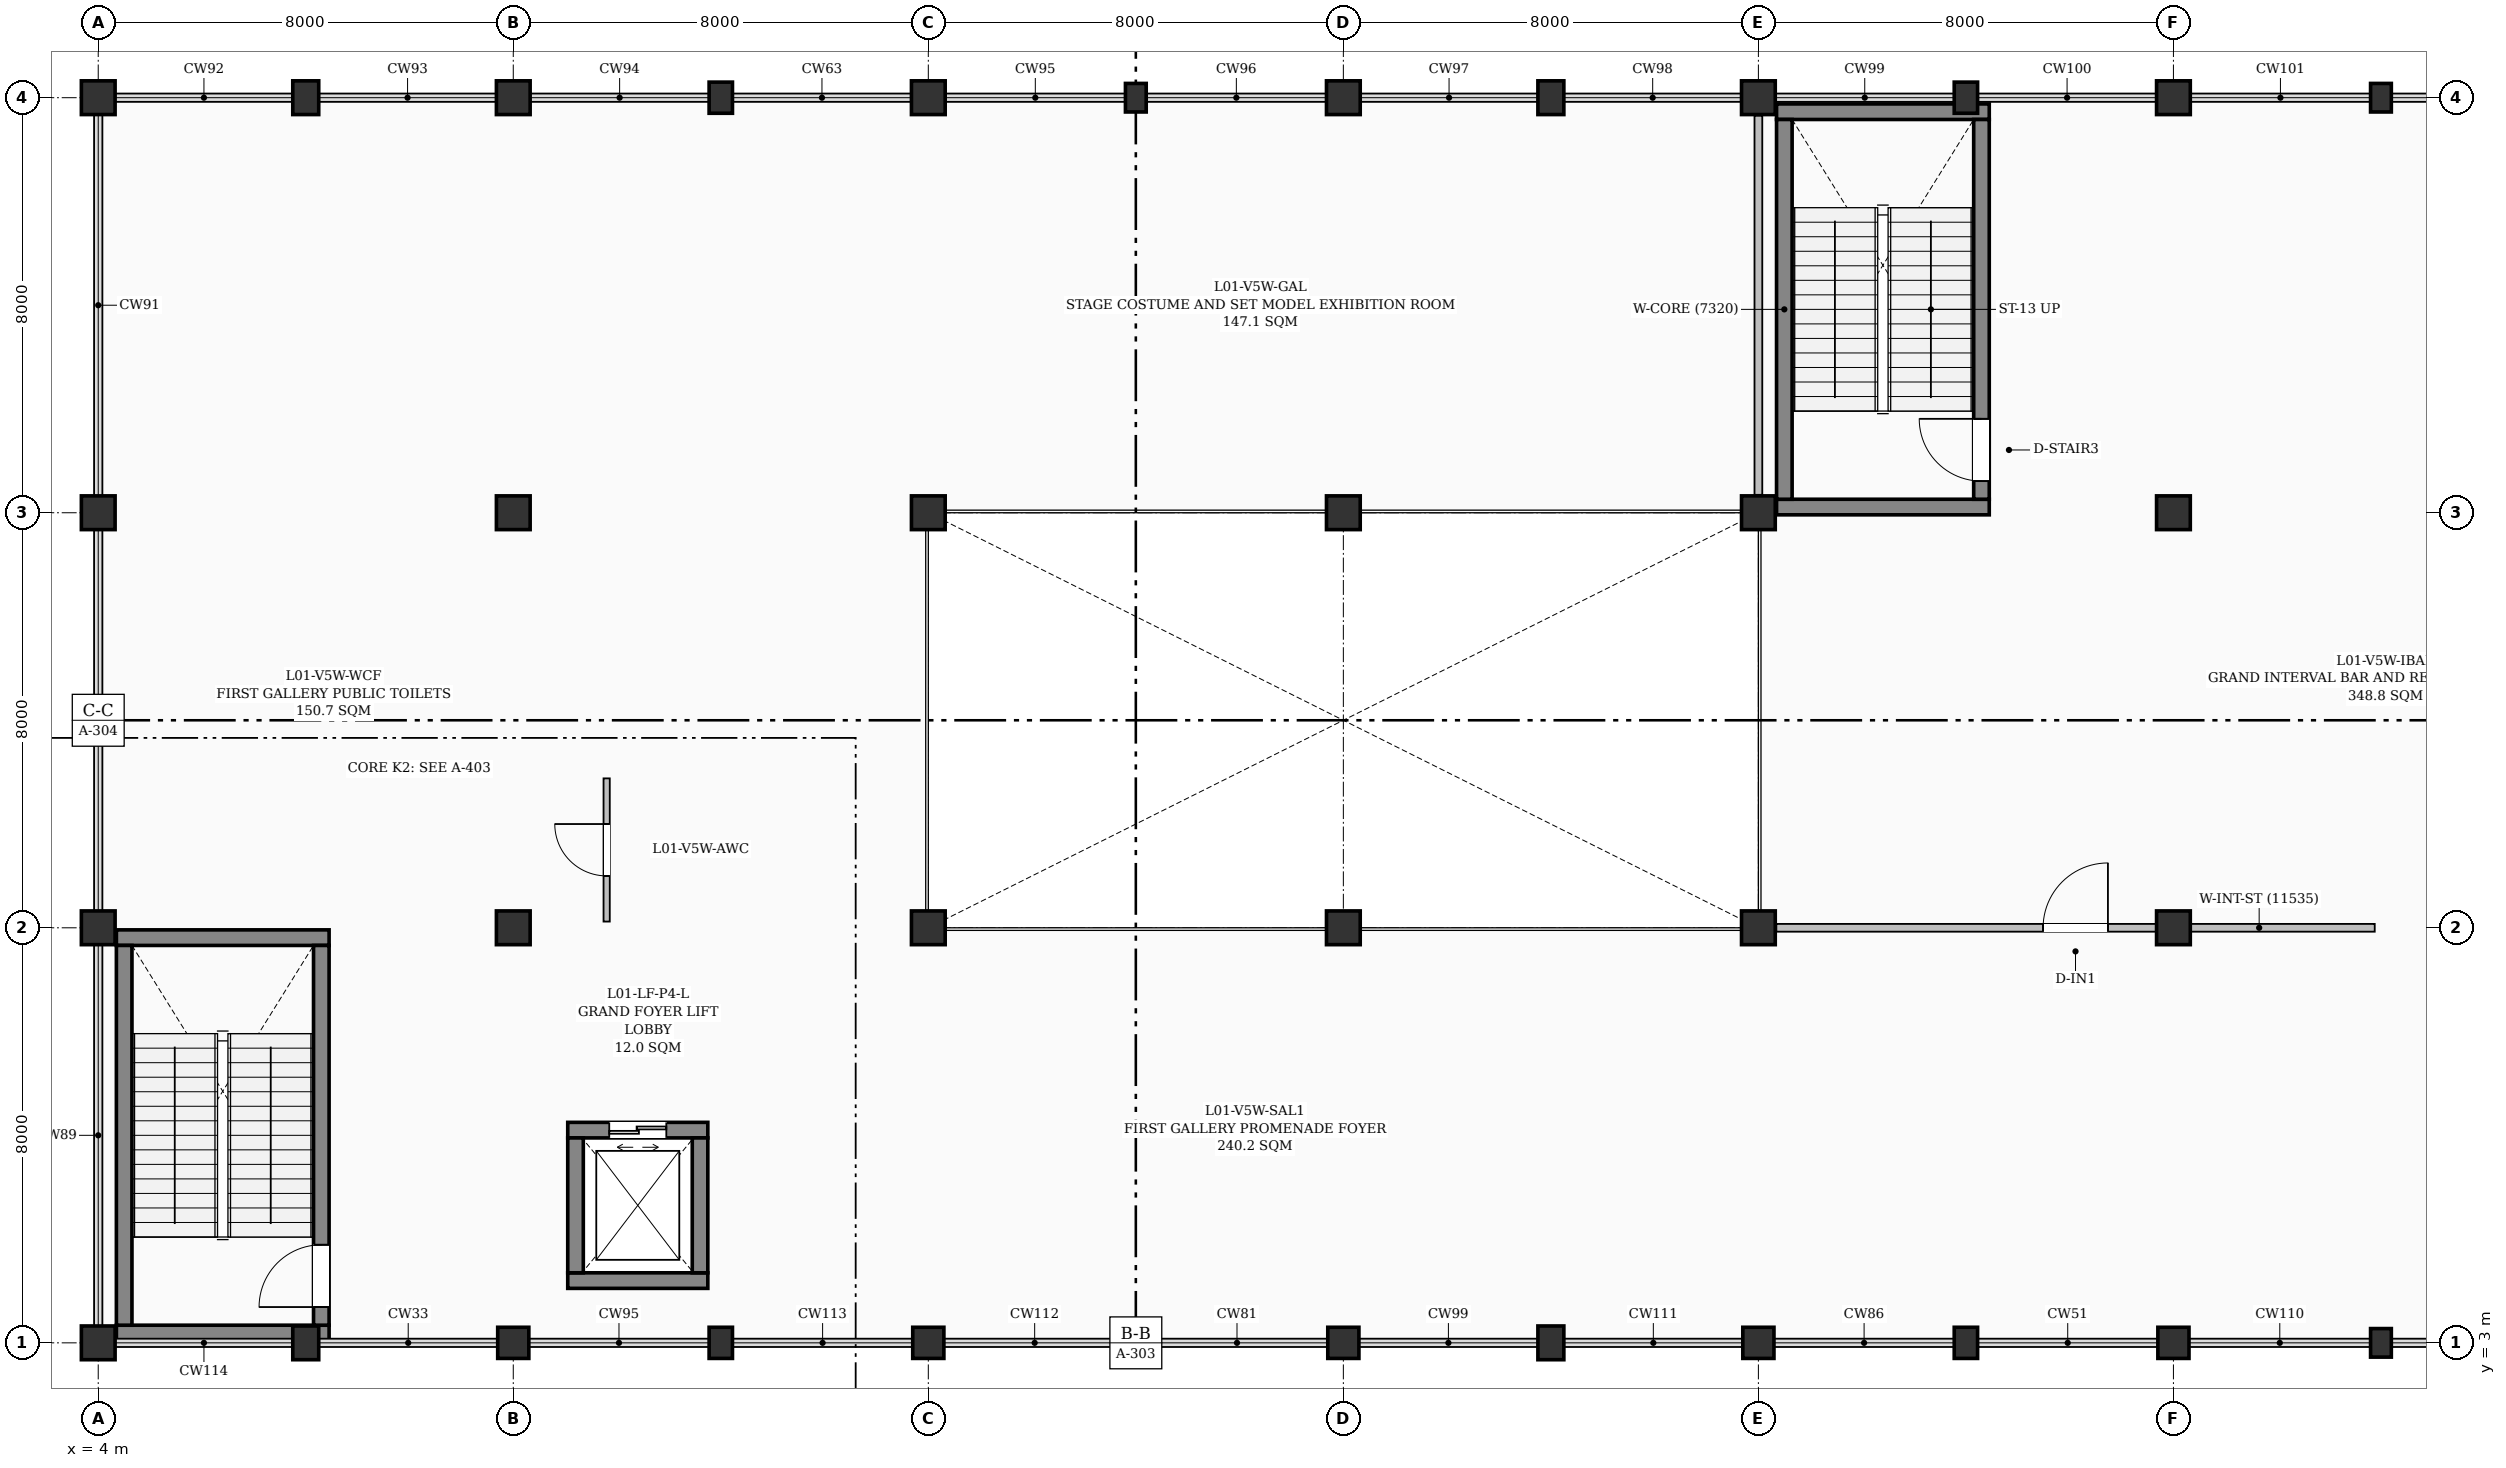
"""IFC4 building model, lengths in metres.
Left out: names, types, materials, properties, quantities, classifications, styles, units other than length and angle.
Written with IfcOpenShell. Run it as: python <this file> out.ifc"""

import sys

from ifc_helpers import new_model, si_unit, direction, frame, frame_2d, origin, origin_2d, place, context, subcontext, project, spatial, rectangle, circle, extrude, element, fill, save


model = new_model("IFC4")
c1 = context("Model", 3, precision=1e-05, world=origin(), true_north=direction((0.0, 1.0)))
c2 = subcontext(c1, "Body", "Model", "MODEL_VIEW")
j1 = project(units=[si_unit("LENGTHUNIT", "METRE"), si_unit("PLANEANGLEUNIT", "RADIAN")], contexts=[c1])
p1 = place(None, origin())
s1 = spatial("IfcSite", under=j1, at=p1, CompositionType="ELEMENT")
p2 = place(p1, origin())
s2 = spatial("IfcBuilding", under=s1, at=p2, CompositionType="ELEMENT")
p3 = place(p2, frame((0.0, 0.0, 4.8)))
s3 = spatial("IfcBuildingStorey", under=s2, at=p3, CompositionType="ELEMENT", Elevation=4.8)
for number, where, z_axis, x_axis in (
    (1, (4.0, 3.0, 0.0), (0.0, 0.0, 1.0), (1.0, 0.0, 0.0)),
    (2, (4.0, 11.0, 0.0), (0.0, 0.0, 1.0), (1.0, 0.0, 0.0)),
    (3, (4.0, 19.0, 0.0), (0.0, 0.0, 1.0), (1.0, 0.0, 0.0)),
    (4, (4.0, 27.0, 0.0), (0.0, 0.0, 1.0), (1.0, 0.0, 0.0)),
):
    element("IfcColumn", number, at=place(p3, frame(where, z_axis=z_axis, x_axis=x_axis)), inside=s3, PredefinedType="COLUMN", context=c2, shape_type="SweptSolid", body=[
        extrude(rectangle(XDim=0.65, YDim=0.65, at=origin_2d()), origin(), (0.0, 0.0, 1.0), 4.5),
    ])
for number, where, z_axis, x_axis in (
    (5, (8.0, 3.0, 0.0), (0.0, 0.0, 1.0), (1.0, 0.0, 0.0)),
    (6, (8.0, 27.0, 0.0), (0.0, 0.0, 1.0), (1.0, 0.0, 0.0)),
):
    element("IfcColumn", number, at=place(p3, frame(where, z_axis=z_axis, x_axis=x_axis)), inside=s3, PredefinedType="PILASTER", context=c2, shape_type="SweptSolid", body=[
        extrude(rectangle(XDim=0.5, YDim=0.65, at=origin_2d()), origin(), (0.0, 0.0, 1.0), 4.5),
    ])
p4 = place(p3, frame((12.0, 3.0, 0.0), z_axis=(0.0, 0.0, 1.0), x_axis=(1.0, 0.0, 0.0)))
e7 = element("IfcColumn", 7, at=p4, inside=s3, PredefinedType="COLUMN", context=c2, shape_type="SweptSolid", body=[
    extrude(circle(Radius=0.3, at=origin_2d()), origin(), (0.0, 0.0, 1.0), 4.5),
])
for number, where, z_axis, x_axis in (
    (8, (12.0, 11.0, 0.0), (0.0, 0.0, 1.0), (1.0, 0.0, 0.0)),
    (9, (12.0, 19.0, 0.0), (0.0, 0.0, 1.0), (1.0, 0.0, 0.0)),
    (10, (12.0, 27.0, 0.0), (0.0, 0.0, 1.0), (1.0, 0.0, 0.0)),
):
    element("IfcColumn", number, at=place(p3, frame(where, z_axis=z_axis, x_axis=x_axis)), inside=s3, PredefinedType="COLUMN", context=c2, shape_type="SweptSolid", body=[
        extrude(rectangle(XDim=0.65, YDim=0.65, at=origin_2d()), origin(), (0.0, 0.0, 1.0), 4.5),
    ])
for number, where, z_axis, x_axis in (
    (11, (16.0, 3.0, 0.0), (0.0, 0.0, 1.0), (1.0, 0.0, 0.0)),
    (12, (16.0, 27.0, 0.0), (0.0, 0.0, 1.0), (1.0, 0.0, 0.0)),
):
    element("IfcColumn", number, at=place(p3, frame(where, z_axis=z_axis, x_axis=x_axis)), inside=s3, PredefinedType="PILASTER", context=c2, shape_type="SweptSolid", body=[
        extrude(rectangle(XDim=0.45, YDim=0.6, at=origin_2d()), origin(), (0.0, 0.0, 1.0), 4.5),
    ])
p5 = place(p3, frame((20.0, 3.0, 0.0), z_axis=(0.0, 0.0, 1.0), x_axis=(1.0, 0.0, 0.0)))
e13 = element("IfcColumn", 13, at=p5, inside=s3, PredefinedType="COLUMN", context=c2, shape_type="SweptSolid", body=[
    extrude(circle(Radius=0.3, at=origin_2d()), origin(), (0.0, 0.0, 1.0), 4.5),
])
for number, where, z_axis, x_axis in (
    (14, (20.0, 11.0, 0.0), (0.0, 0.0, 1.0), (1.0, 0.0, 0.0)),
    (15, (20.0, 19.0, 0.0), (0.0, 0.0, 1.0), (1.0, 0.0, 0.0)),
    (16, (20.0, 27.0, 0.0), (0.0, 0.0, 1.0), (1.0, 0.0, 0.0)),
):
    element("IfcColumn", number, at=place(p3, frame(where, z_axis=z_axis, x_axis=x_axis)), inside=s3, PredefinedType="COLUMN", context=c2, shape_type="SweptSolid", body=[
        extrude(rectangle(XDim=0.65, YDim=0.65, at=origin_2d()), origin(), (0.0, 0.0, 1.0), 4.5),
    ])
for number, where, z_axis, x_axis in (
    (17, (24.0, 3.0, 0.0), (0.0, 0.0, 1.0), (1.0, 0.0, 0.0)),
    (18, (24.0, 27.0, 0.0), (0.0, 0.0, 1.0), (1.0, 0.0, 0.0)),
):
    element("IfcColumn", number, at=place(p3, frame(where, z_axis=z_axis, x_axis=x_axis)), inside=s3, PredefinedType="PILASTER", context=c2, shape_type="SweptSolid", body=[
        extrude(rectangle(XDim=0.4, YDim=0.55, at=origin_2d()), origin(), (0.0, 0.0, 1.0), 4.5),
    ])
p6 = place(p3, frame((28.0, 3.0, 0.0), z_axis=(0.0, 0.0, 1.0), x_axis=(1.0, 0.0, 0.0)))
e19 = element("IfcColumn", 19, at=p6, inside=s3, PredefinedType="COLUMN", context=c2, shape_type="SweptSolid", body=[
    extrude(circle(Radius=0.3, at=origin_2d()), origin(), (0.0, 0.0, 1.0), 4.5),
])
for number, where, z_axis, x_axis in (
    (20, (28.0, 11.0, 0.0), (0.0, 0.0, 1.0), (1.0, 0.0, 0.0)),
    (21, (28.0, 19.0, 0.0), (0.0, 0.0, 1.0), (1.0, 0.0, 0.0)),
    (22, (28.0, 27.0, 0.0), (0.0, 0.0, 1.0), (1.0, 0.0, 0.0)),
):
    element("IfcColumn", number, at=place(p3, frame(where, z_axis=z_axis, x_axis=x_axis)), inside=s3, PredefinedType="COLUMN", context=c2, shape_type="SweptSolid", body=[
        extrude(rectangle(XDim=0.65, YDim=0.65, at=origin_2d()), origin(), (0.0, 0.0, 1.0), 4.5),
    ])
for number, where, z_axis, x_axis in (
    (23, (32.0, 3.0, 0.0), (0.0, 0.0, 1.0), (1.0, 0.0, 0.0)),
    (24, (32.0, 27.0, 0.0), (0.0, 0.0, 1.0), (1.0, 0.0, 0.0)),
):
    element("IfcColumn", number, at=place(p3, frame(where, z_axis=z_axis, x_axis=x_axis)), inside=s3, PredefinedType="PILASTER", context=c2, shape_type="SweptSolid", body=[
        extrude(rectangle(XDim=0.5, YDim=0.65, at=origin_2d()), origin(), (0.0, 0.0, 1.0), 4.5),
    ])
p7 = place(p3, frame((36.0, 3.0, 0.0), z_axis=(0.0, 0.0, 1.0), x_axis=(1.0, 0.0, 0.0)))
e25 = element("IfcColumn", 25, at=p7, inside=s3, PredefinedType="COLUMN", context=c2, shape_type="SweptSolid", body=[
    extrude(circle(Radius=0.3, at=origin_2d()), origin(), (0.0, 0.0, 1.0), 4.5),
])
for number, where, z_axis, x_axis in (
    (26, (36.0, 11.0, 0.0), (0.0, 0.0, 1.0), (1.0, 0.0, 0.0)),
    (27, (36.0, 19.0, 0.0), (0.0, 0.0, 1.0), (1.0, 0.0, 0.0)),
    (28, (36.0, 27.0, 0.0), (0.0, 0.0, 1.0), (1.0, 0.0, 0.0)),
):
    element("IfcColumn", number, at=place(p3, frame(where, z_axis=z_axis, x_axis=x_axis)), inside=s3, PredefinedType="COLUMN", context=c2, shape_type="SweptSolid", body=[
        extrude(rectangle(XDim=0.65, YDim=0.65, at=origin_2d()), origin(), (0.0, 0.0, 1.0), 4.5),
    ])
for number, where, z_axis, x_axis in (
    (29, (40.0, 3.0, 0.0), (0.0, 0.0, 1.0), (1.0, 0.0, 0.0)),
    (30, (40.0, 27.0, 0.0), (0.0, 0.0, 1.0), (1.0, 0.0, 0.0)),
):
    element("IfcColumn", number, at=place(p3, frame(where, z_axis=z_axis, x_axis=x_axis)), inside=s3, PredefinedType="PILASTER", context=c2, shape_type="SweptSolid", body=[
        extrude(rectangle(XDim=0.45, YDim=0.6, at=origin_2d()), origin(), (0.0, 0.0, 1.0), 4.5),
    ])
p8 = place(p3, frame((44.0, 3.0, 0.0), z_axis=(0.0, 0.0, 1.0), x_axis=(1.0, 0.0, 0.0)))
e31 = element("IfcColumn", 31, at=p8, inside=s3, PredefinedType="COLUMN", context=c2, shape_type="SweptSolid", body=[
    extrude(circle(Radius=0.3, at=origin_2d()), origin(), (0.0, 0.0, 1.0), 4.5),
])
for number, where, z_axis, x_axis in (
    (32, (44.0, 11.0, 0.0), (0.0, 0.0, 1.0), (1.0, 0.0, 0.0)),
    (33, (44.0, 19.0, 0.0), (0.0, 0.0, 1.0), (1.0, 0.0, 0.0)),
    (34, (44.0, 27.0, 0.0), (0.0, 0.0, 1.0), (1.0, 0.0, 0.0)),
):
    element("IfcColumn", number, at=place(p3, frame(where, z_axis=z_axis, x_axis=x_axis)), inside=s3, PredefinedType="COLUMN", context=c2, shape_type="SweptSolid", body=[
        extrude(rectangle(XDim=0.65, YDim=0.65, at=origin_2d()), origin(), (0.0, 0.0, 1.0), 4.5),
    ])
for number, where, z_axis, x_axis in (
    (35, (48.0, 3.0, 0.0), (0.0, 0.0, 1.0), (1.0, 0.0, 0.0)),
    (36, (48.0, 27.0, 0.0), (0.0, 0.0, 1.0), (1.0, 0.0, 0.0)),
):
    element("IfcColumn", number, at=place(p3, frame(where, z_axis=z_axis, x_axis=x_axis)), inside=s3, PredefinedType="PILASTER", context=c2, shape_type="SweptSolid", body=[
        extrude(rectangle(XDim=0.4, YDim=0.55, at=origin_2d()), origin(), (0.0, 0.0, 1.0), 4.5),
    ])
for number, where, z_axis, x_axis in (
    (37, (4.35, 3.19, 0.0), (0.0, 0.0, 1.0), (1.0, 0.0, 0.0)),
    (38, (8.45, 10.81, 0.0), (0.0, 0.0, 1.0), (-1.0, 0.0, 0.0)),
):
    element("IfcWall", number, at=place(p3, frame(where, z_axis=z_axis, x_axis=x_axis)), inside=s3, PredefinedType="SHEAR", context=c2, shape_type="SweptSolid", body=[
        extrude(rectangle(XDim=4.1, YDim=0.3, at=frame_2d((2.05, 0.0))), origin(), (0.0, 0.0, 1.0), 4.25),
    ])
p9 = place(p3, frame((4.5, 3.34, 0.0), z_axis=(0.0, 0.0, 1.0), x_axis=(0.0, 1.0, 0.0)))
e39 = element("IfcWall", 39, at=p9, inside=s3, PredefinedType="SHEAR", context=c2, shape_type="SweptSolid", body=[
    extrude(rectangle(XDim=7.32, YDim=0.3, at=frame_2d((3.66, 0.0))), origin(), (0.0, 0.0, 1.0), 4.25),
])
p10 = place(p3, frame((8.3, 3.34, 0.0), z_axis=(0.0, 0.0, 1.0), x_axis=(0.0, 1.0, 0.0)))
e40 = element("IfcWall", 40, at=p10, inside=s3, PredefinedType="SHEAR", context=c2, shape_type="SweptSolid", body=[
    extrude(rectangle(XDim=7.32, YDim=0.3, at=frame_2d((3.66, 0.0))), origin(), (0.0, 0.0, 1.0), 4.25),
])
p11 = place(p10, frame((0.35, 0.0, 0.0)))
e41 = element("IfcOpeningElement", 41, at=p11, cuts=e40, PredefinedType="OPENING", context=c2, shape_type="SweptSolid", body=[
    extrude(rectangle(XDim=1.2, YDim=2.15, at=frame_2d((0.6, 1.075))), frame((0.0, 0.16, 0.0), z_axis=(0.0, -1.0, 0.0), x_axis=(1.0, 0.0, 0.0)), (0.0, 0.0, 1.0), 0.32),
])
for number, where, z_axis, x_axis in (
    (42, (36.35, 19.11, 0.0), (0.0, 0.0, 1.0), (1.0, 0.0, 0.0)),
    (43, (40.45, 26.73, 0.0), (0.0, 0.0, 1.0), (-1.0, 0.0, 0.0)),
):
    element("IfcWall", number, at=place(p3, frame(where, z_axis=z_axis, x_axis=x_axis)), inside=s3, PredefinedType="SHEAR", context=c2, shape_type="SweptSolid", body=[
        extrude(rectangle(XDim=4.1, YDim=0.3, at=frame_2d((2.05, 0.0))), origin(), (0.0, 0.0, 1.0), 4.25),
    ])
p12 = place(p3, frame((36.5, 19.26, 0.0), z_axis=(0.0, 0.0, 1.0), x_axis=(0.0, 1.0, 0.0)))
e44 = element("IfcWall", 44, at=p12, inside=s3, PredefinedType="SHEAR", context=c2, shape_type="SweptSolid", body=[
    extrude(rectangle(XDim=7.32, YDim=0.3, at=frame_2d((3.66, 0.0))), origin(), (0.0, 0.0, 1.0), 4.25),
])
p13 = place(p3, frame((40.3, 19.26, 0.0), z_axis=(0.0, 0.0, 1.0), x_axis=(0.0, 1.0, 0.0)))
e45 = element("IfcWall", 45, at=p13, inside=s3, PredefinedType="SHEAR", context=c2, shape_type="SweptSolid", body=[
    extrude(rectangle(XDim=7.32, YDim=0.3, at=frame_2d((3.66, 0.0))), origin(), (0.0, 0.0, 1.0), 4.25),
])
p14 = place(p13, frame((0.35, 0.0, 0.0)))
e46 = element("IfcOpeningElement", 46, at=p14, cuts=e45, PredefinedType="OPENING", context=c2, shape_type="SweptSolid", body=[
    extrude(rectangle(XDim=1.2, YDim=2.15, at=frame_2d((0.6, 1.075))), frame((0.0, 0.16, 0.0), z_axis=(0.0, -1.0, 0.0), x_axis=(1.0, 0.0, 0.0)), (0.0, 0.0, 1.0), 0.32),
])
p15 = place(p3, frame((13.05, 4.2, 0.0), z_axis=(0.0, 0.0, 1.0), x_axis=(1.0, 0.0, 0.0)))
e47 = element("IfcWall", 47, at=p15, inside=s3, PredefinedType="SHEAR", context=c2, shape_type="SweptSolid", body=[
    extrude(rectangle(XDim=2.7, YDim=0.3, at=frame_2d((1.35, 0.0))), origin(), (0.0, 0.0, 1.0), 4.25),
])
p16 = place(p3, frame((15.75, 7.1, 0.0), z_axis=(0.0, 0.0, 1.0), x_axis=(-1.0, 0.0, 0.0)))
e48 = element("IfcWall", 48, at=p16, inside=s3, PredefinedType="SHEAR", context=c2, shape_type="SweptSolid", body=[
    extrude(rectangle(XDim=2.7, YDim=0.3, at=frame_2d((1.35, 0.0))), origin(), (0.0, 0.0, 1.0), 4.25),
])
p17 = place(p16, frame((0.8, 0.0, 0.0)))
e49 = element("IfcOpeningElement", 49, at=p17, cuts=e48, PredefinedType="OPENING", context=c2, shape_type="SweptSolid", body=[
    extrude(rectangle(XDim=1.1, YDim=2.15, at=frame_2d((0.55, 1.075))), frame((0.0, 0.16, 0.0), z_axis=(0.0, -1.0, 0.0), x_axis=(1.0, 0.0, 0.0)), (0.0, 0.0, 1.0), 0.32),
])
for number, where, z_axis, x_axis in (
    (50, (13.2, 4.35, 0.0), (0.0, 0.0, 1.0), (0.0, 1.0, 0.0)),
    (51, (15.6, 6.95, 0.0), (0.0, 0.0, 1.0), (0.0, -1.0, 0.0)),
):
    element("IfcWall", number, at=place(p3, frame(where, z_axis=z_axis, x_axis=x_axis)), inside=s3, PredefinedType="SHEAR", context=c2, shape_type="SweptSolid", body=[
        extrude(rectangle(XDim=2.6, YDim=0.3, at=frame_2d((1.3, 0.0))), origin(), (0.0, 0.0, 1.0), 4.25),
    ])
p18 = place(p3, frame((36.345, 11.0, 0.0), z_axis=(0.0, 0.0, 1.0), x_axis=(1.0, 0.0, 0.0)))
e52 = element("IfcWall", 52, at=p18, inside=s3, PredefinedType="PARTITIONING", context=c2, shape_type="SweptSolid", body=[
    extrude(rectangle(XDim=11.535, YDim=0.15, at=frame_2d((5.768, 0.0))), origin(), (0.0, 0.0, 1.0), 3.945),
])
p19 = place(p18, frame((5.143, 0.0, 0.0)))
e53 = element("IfcOpeningElement", 53, at=p19, cuts=e52, PredefinedType="OPENING", context=c2, shape_type="SweptSolid", body=[
    extrude(rectangle(XDim=1.25, YDim=2.15, at=frame_2d((0.625, 1.075))), frame((0.0, 0.085, 0.0), z_axis=(0.0, -1.0, 0.0), x_axis=(1.0, 0.0, 0.0)), (0.0, 0.0, 1.0), 0.17),
])
p20 = place(p3, frame((36.0, 19.345, 0.0), z_axis=(0.0, 0.0, 1.0), x_axis=(0.0, 1.0, 0.0)))
e54 = element("IfcWall", 54, at=p20, inside=s3, PredefinedType="PARTITIONING", context=c2, shape_type="SweptSolid", body=[
    extrude(rectangle(XDim=7.31, YDim=0.15, at=frame_2d((3.655, 0.0))), origin(), (0.0, 0.0, 1.0), 3.635),
])
p21 = place(p3, frame((13.8, 11.12, 0.0), z_axis=(0.0, 0.0, 1.0), x_axis=(0.0, 1.0, 0.0)))
e55 = element("IfcWall", 55, at=p21, inside=s3, PredefinedType="PARTITIONING", context=c2, shape_type="SweptSolid", body=[
    extrude(rectangle(XDim=2.76, YDim=0.12, at=frame_2d((1.38, 0.0))), origin(), (0.0, 0.0, 1.0), 4.25),
])
p22 = place(p21, frame((0.88, 0.0, 0.0)))
e56 = element("IfcOpeningElement", 56, at=p22, cuts=e55, PredefinedType="OPENING", context=c2, shape_type="SweptSolid", body=[
    extrude(rectangle(XDim=1.0, YDim=2.1, at=frame_2d((0.5, 1.05))), frame((0.0, 0.07, 0.0), z_axis=(0.0, -1.0, 0.0), x_axis=(1.0, 0.0, 0.0)), (0.0, 0.0, 1.0), 0.14),
])
p23 = place(p11, origin())
e57 = element("IfcDoor", 57, at=p23, inside=s3, OperationType="SINGLE_SWING_LEFT", PredefinedType="DOOR", context=c2, shape_type="SweptSolid", body=[
    extrude(rectangle(XDim=1.2, YDim=2.15, at=frame_2d((0.6, 1.075))), frame((0.0, 0.025, 0.0), z_axis=(0.0, -1.0, 0.0), x_axis=(1.0, 0.0, 0.0)), (0.0, 0.0, 1.0), 0.05),
])
fill(e41, e57)
p24 = place(p14, origin())
e58 = element("IfcDoor", 58, at=p24, inside=s3, OperationType="SINGLE_SWING_RIGHT", PredefinedType="DOOR", context=c2, shape_type="SweptSolid", body=[
    extrude(rectangle(XDim=1.2, YDim=2.15, at=frame_2d((0.6, 1.075))), frame((0.0, 0.025, 0.0), z_axis=(0.0, -1.0, 0.0), x_axis=(1.0, 0.0, 0.0)), (0.0, 0.0, 1.0), 0.05),
])
fill(e46, e58)
p25 = place(p17, origin())
e59 = element("IfcDoor", 59, at=p25, inside=s3, OperationType="DOUBLE_DOOR_SLIDING", PredefinedType="DOOR", context=c2, shape_type="SweptSolid", body=[
    extrude(rectangle(XDim=1.1, YDim=2.15, at=frame_2d((0.55, 1.075))), frame((0.0, 0.025, 0.0), z_axis=(0.0, -1.0, 0.0), x_axis=(1.0, 0.0, 0.0)), (0.0, 0.0, 1.0), 0.05),
])
fill(e49, e59)
p26 = place(p19, origin())
e60 = element("IfcDoor", 60, at=p26, inside=s3, OperationType="SINGLE_SWING_RIGHT", PredefinedType="DOOR", context=c2, shape_type="SweptSolid", body=[
    extrude(rectangle(XDim=1.25, YDim=2.15, at=frame_2d((0.625, 1.075))), frame((0.0, 0.025, 0.0), z_axis=(0.0, -1.0, 0.0), x_axis=(1.0, 0.0, 0.0)), (0.0, 0.0, 1.0), 0.05),
])
fill(e53, e60)
p27 = place(p22, origin())
e61 = element("IfcDoor", 61, at=p27, inside=s3, OperationType="SINGLE_SWING_RIGHT", PredefinedType="DOOR", context=c2, shape_type="SweptSolid", body=[
    extrude(rectangle(XDim=1.0, YDim=2.1, at=frame_2d((0.5, 1.05))), frame((0.0, 0.025, 0.0), z_axis=(0.0, -1.0, 0.0), x_axis=(1.0, 0.0, 0.0)), (0.0, 0.0, 1.0), 0.05),
])
fill(e56, e61)
save(model, sys.argv[1])
